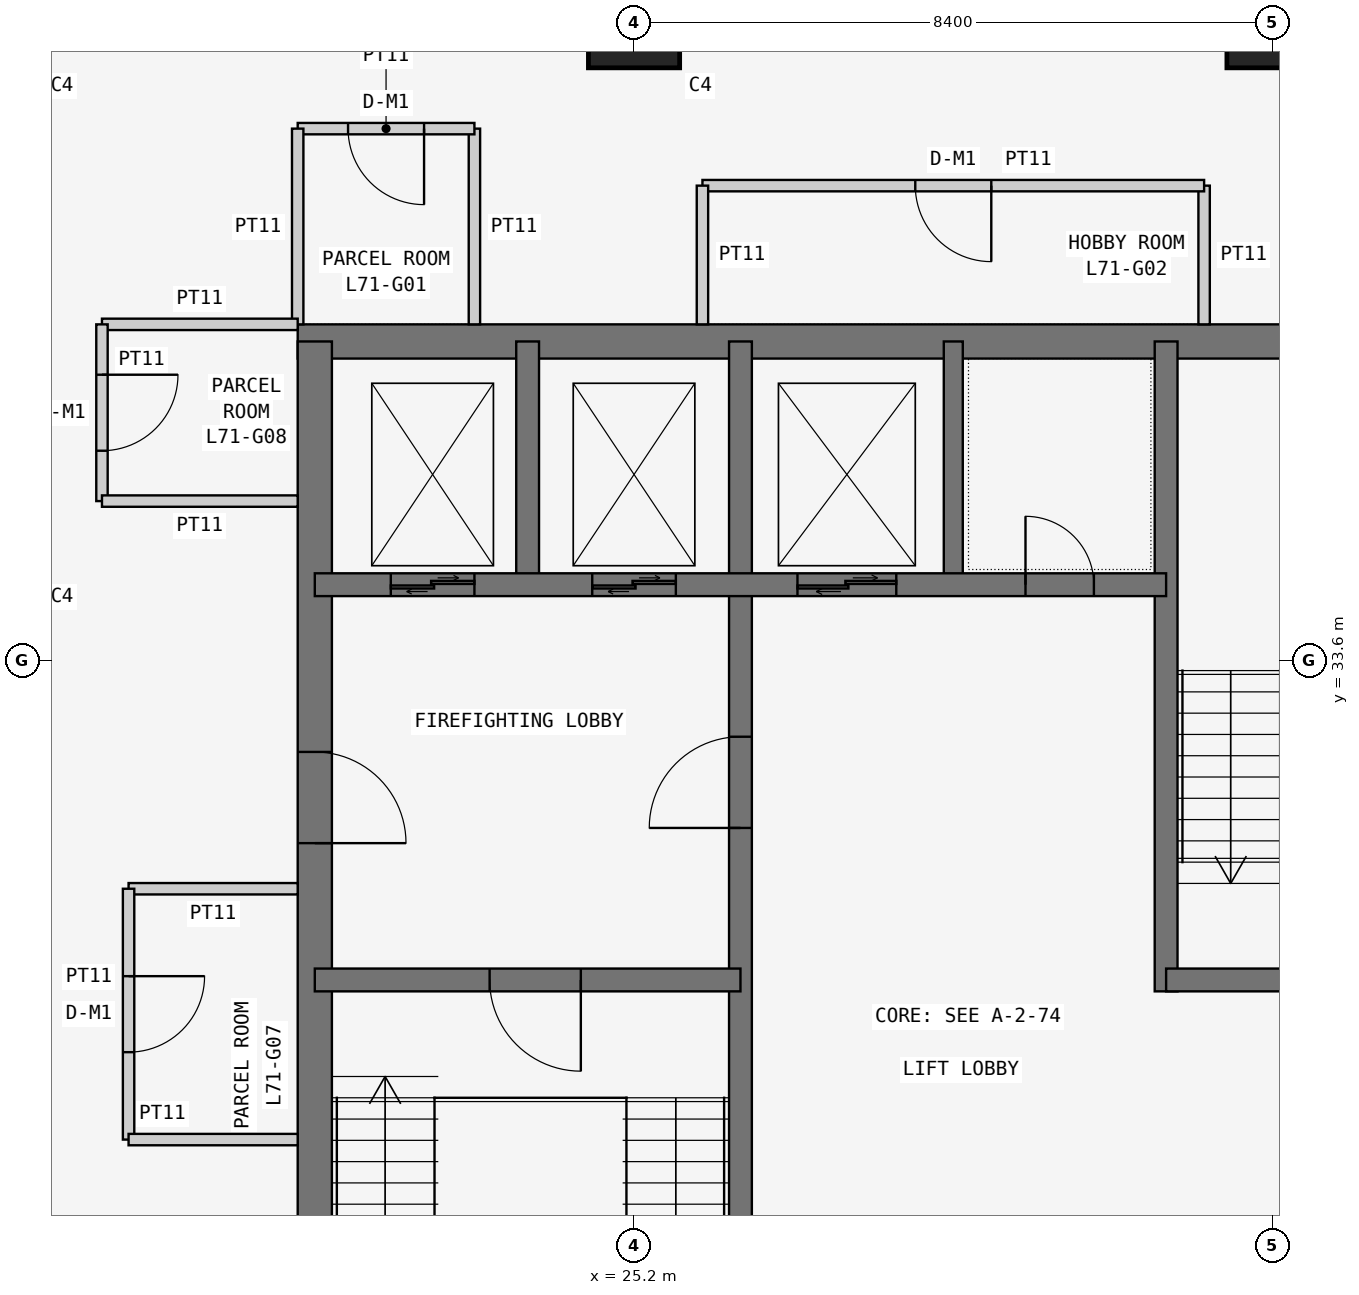
"""IFC4 building model, lengths in metres.
Left out: names, types, materials, properties, quantities, classifications, styles, units other than length and angle.
Written with IfcOpenShell. Run it as: python <this file> out.ifc"""

import sys

from ifc_helpers import new_model, si_unit, direction, frame, frame_2d, origin, origin_2d, place, context, subcontext, project, spatial, rectangle, extrude, element, fill, save


model = new_model("IFC4")
c1 = context("Model", 3, precision=1e-05, world=origin(), true_north=direction((0.0, 1.0)))
c2 = subcontext(c1, "Body", "Model", "MODEL_VIEW")
j1 = project(units=[si_unit("LENGTHUNIT", "METRE"), si_unit("PLANEANGLEUNIT", "RADIAN")], contexts=[c1])
p1 = place(None, origin())
s1 = spatial("IfcSite", under=j1, at=p1, CompositionType="ELEMENT")
p2 = place(p1, origin())
s2 = spatial("IfcBuilding", under=s1, at=p2, CompositionType="ELEMENT")
p3 = place(p2, frame((0.0, 0.0, 272.1)))
s3 = spatial("IfcBuildingStorey", under=s2, at=p3, CompositionType="ELEMENT", Elevation=272.1)
for number, where, z_axis, x_axis in (
    (1, (25.2, 42.0, 0.0), (0.0, 0.0, 1.0), (1.0, 0.0, 0.0)),
    (2, (33.6, 42.0, 0.0), (0.0, 0.0, 1.0), (1.0, 0.0, 0.0)),
):
    element("IfcColumn", number, at=place(p3, frame(where, z_axis=z_axis, x_axis=x_axis)), inside=s3, PredefinedType="COLUMN", context=c2, shape_type="SweptSolid", body=[
        extrude(rectangle(XDim=1.2, YDim=1.2, at=origin_2d()), origin(), (0.0, 0.0, 1.0), 3.6),
    ])
p4 = place(p3, frame((37.8, 37.8, 0.0), z_axis=(0.0, 0.0, 1.0), x_axis=(-1.0, 0.0, 0.0)))
e3 = element("IfcWall", 3, at=p4, inside=s3, PredefinedType="SHEAR", context=c2, shape_type="SweptSolid", body=[
    extrude(rectangle(XDim=17.025, YDim=0.45, at=frame_2d((8.513, 0.0))), origin(), (0.0, 0.0, 1.0), 3.6),
])
p5 = place(p3, frame((21.0, 37.8, 0.0), z_axis=(0.0, 0.0, 1.0), x_axis=(0.0, -1.0, 0.0)))
e4 = element("IfcWall", 4, at=p5, inside=s3, PredefinedType="SHEAR", context=c2, shape_type="SweptSolid", body=[
    extrude(rectangle(XDim=17.025, YDim=0.45, at=frame_2d((8.513, 0.0))), origin(), (0.0, 0.0, 1.0), 3.6),
])
p6 = place(p5, frame((5.4, 0.0, 0.0)))
e5 = element("IfcOpeningElement", 5, at=p6, cuts=e4, PredefinedType="OPENING", context=c2, shape_type="SweptSolid", body=[
    extrude(rectangle(XDim=1.2, YDim=2.1, at=frame_2d((0.6, 1.05))), frame((0.0, 0.235, 0.0), z_axis=(0.0, -1.0, 0.0), x_axis=(1.0, 0.0, 0.0)), (0.0, 0.0, 1.0), 0.47),
])
p7 = place(p3, frame((26.6, 21.0, 0.0), z_axis=(0.0, 0.0, 1.0), x_axis=(0.0, 1.0, 0.0)))
e6 = element("IfcWall", 6, at=p7, inside=s3, PredefinedType="SHEAR", context=c2, shape_type="SweptSolid", body=[
    extrude(rectangle(XDim=16.8, YDim=0.3, at=frame_2d((8.4, 0.0))), origin(), (0.0, 0.0, 1.0), 3.6),
])
p8 = place(p7, frame((10.4, 0.0, 0.0)))
e7 = element("IfcOpeningElement", 7, at=p8, cuts=e6, PredefinedType="OPENING", context=c2, shape_type="SweptSolid", body=[
    extrude(rectangle(XDim=1.2, YDim=2.1, at=frame_2d((0.6, 1.05))), frame((0.0, 0.16, 0.0), z_axis=(0.0, -1.0, 0.0), x_axis=(1.0, 0.0, 0.0)), (0.0, 0.0, 1.0), 0.32),
])
p9 = place(p3, frame((21.0, 29.4, 0.0), z_axis=(0.0, 0.0, 1.0), x_axis=(1.0, 0.0, 0.0)))
e8 = element("IfcWall", 8, at=p9, inside=s3, PredefinedType="SHEAR", context=c2, shape_type="SweptSolid", body=[
    extrude(rectangle(XDim=5.6, YDim=0.3, at=frame_2d((2.8, 0.0))), origin(), (0.0, 0.0, 1.0), 3.6),
])
p10 = place(p9, frame((2.3, 0.0, 0.0)))
e9 = element("IfcOpeningElement", 9, at=p10, cuts=e8, PredefinedType="OPENING", context=c2, shape_type="SweptSolid", body=[
    extrude(rectangle(XDim=1.2, YDim=2.1, at=frame_2d((0.6, 1.05))), frame((0.0, 0.16, 0.0), z_axis=(0.0, -1.0, 0.0), x_axis=(1.0, 0.0, 0.0)), (0.0, 0.0, 1.0), 0.32),
])
p11 = place(p3, frame((21.0, 34.6, 0.0), z_axis=(0.0, 0.0, 1.0), x_axis=(1.0, 0.0, 0.0)))
e10 = element("IfcWall", 10, at=p11, inside=s3, PredefinedType="SHEAR", context=c2, shape_type="SweptSolid", body=[
    extrude(rectangle(XDim=11.2, YDim=0.3, at=frame_2d((5.6, 0.0))), origin(), (0.0, 0.0, 1.0), 3.6),
])
p12 = place(p11, frame((9.35, 0.0, 0.0)))
e11 = element("IfcOpeningElement", 11, at=p12, cuts=e10, PredefinedType="OPENING", context=c2, shape_type="SweptSolid", body=[
    extrude(rectangle(XDim=0.9, YDim=2.1, at=frame_2d((0.45, 1.05))), frame((0.0, 0.16, 0.0), z_axis=(0.0, -1.0, 0.0), x_axis=(1.0, 0.0, 0.0)), (0.0, 0.0, 1.0), 0.32),
])
p13 = place(p11, frame((1.0, 0.0, 0.0)))
e12 = element("IfcOpeningElement", 12, at=p13, cuts=e10, PredefinedType="OPENING", context=c2, shape_type="SweptSolid", body=[
    extrude(rectangle(XDim=1.1, YDim=2.1, at=frame_2d((0.55, 1.05))), frame((0.0, 0.16, 0.0), z_axis=(0.0, -1.0, 0.0), x_axis=(1.0, 0.0, 0.0)), (0.0, 0.0, 1.0), 0.32),
])
p14 = place(p11, frame((3.65, 0.0, 0.0)))
e13 = element("IfcOpeningElement", 13, at=p14, cuts=e10, PredefinedType="OPENING", context=c2, shape_type="SweptSolid", body=[
    extrude(rectangle(XDim=1.1, YDim=2.1, at=frame_2d((0.55, 1.05))), frame((0.0, 0.16, 0.0), z_axis=(0.0, -1.0, 0.0), x_axis=(1.0, 0.0, 0.0)), (0.0, 0.0, 1.0), 0.32),
])
p15 = place(p11, frame((6.35, 0.0, 0.0)))
e14 = element("IfcOpeningElement", 14, at=p15, cuts=e10, PredefinedType="OPENING", context=c2, shape_type="SweptSolid", body=[
    extrude(rectangle(XDim=1.3, YDim=2.1, at=frame_2d((0.65, 1.05))), frame((0.0, 0.16, 0.0), z_axis=(0.0, -1.0, 0.0), x_axis=(1.0, 0.0, 0.0)), (0.0, 0.0, 1.0), 0.32),
])
p16 = place(p3, frame((23.8, 34.6, 0.0), z_axis=(0.0, 0.0, 1.0), x_axis=(0.0, 1.0, 0.0)))
e15 = element("IfcWall", 15, at=p16, inside=s3, PredefinedType="SHEAR", context=c2, shape_type="SweptSolid", body=[
    extrude(rectangle(XDim=3.2, YDim=0.3, at=frame_2d((1.6, 0.0))), origin(), (0.0, 0.0, 1.0), 3.6),
])
p17 = place(p3, frame((32.2, 29.25, 0.0), z_axis=(0.0, 0.0, 1.0), x_axis=(0.0, 1.0, 0.0)))
e16 = element("IfcWall", 16, at=p17, inside=s3, PredefinedType="SHEAR", context=c2, shape_type="SweptSolid", body=[
    extrude(rectangle(XDim=8.55, YDim=0.3, at=frame_2d((4.275, 0.0))), origin(), (0.0, 0.0, 1.0), 3.6),
])
p18 = place(p3, frame((32.2, 29.4, 0.0), z_axis=(0.0, 0.0, 1.0), x_axis=(1.0, 0.0, 0.0)))
e17 = element("IfcWall", 17, at=p18, inside=s3, PredefinedType="SHEAR", context=c2, shape_type="SweptSolid", body=[
    extrude(rectangle(XDim=5.6, YDim=0.3, at=frame_2d((2.8, 0.0))), origin(), (0.0, 0.0, 1.0), 3.6),
])
p19 = place(p18, frame((2.0, 0.0, 0.0)))
e18 = element("IfcOpeningElement", 18, at=p19, cuts=e17, PredefinedType="OPENING", context=c2, shape_type="SweptSolid", body=[
    extrude(rectangle(XDim=1.2, YDim=2.1, at=frame_2d((0.6, 1.05))), frame((0.0, 0.16, 0.0), z_axis=(0.0, -1.0, 0.0), x_axis=(1.0, 0.0, 0.0)), (0.0, 0.0, 1.0), 0.32),
])
p20 = place(p3, frame((29.4, 34.6, 0.0), z_axis=(0.0, 0.0, 1.0), x_axis=(0.0, 1.0, 0.0)))
e19 = element("IfcWall", 19, at=p20, inside=s3, PredefinedType="SHEAR", context=c2, shape_type="SweptSolid", body=[
    extrude(rectangle(XDim=3.2, YDim=0.25, at=frame_2d((1.6, 0.0))), origin(), (0.0, 0.0, 1.0), 3.6),
])
p21 = place(p3, frame((23.1, 38.025, 0.0), z_axis=(0.0, 0.0, 1.0), x_axis=(0.0, 1.0, 0.0)))
e20 = element("IfcWall", 20, at=p21, inside=s3, PredefinedType="PARTITIONING", context=c2, shape_type="SweptSolid", body=[
    extrude(rectangle(XDim=2.575, YDim=0.15, at=frame_2d((1.288, 0.0))), origin(), (0.0, 0.0, 1.0), 3.45),
])
p22 = place(p3, frame((23.1, 40.6, 0.0), z_axis=(0.0, 0.0, 1.0), x_axis=(-1.0, 0.0, 0.0)))
e21 = element("IfcWall", 21, at=p22, inside=s3, PredefinedType="PARTITIONING", context=c2, shape_type="SweptSolid", body=[
    extrude(rectangle(XDim=2.325, YDim=0.15, at=frame_2d((1.163, 0.0))), origin(), (0.0, 0.0, 1.0), 3.45),
])
p23 = place(p22, frame((0.663, 0.0, 0.0)))
e22 = element("IfcOpeningElement", 22, at=p23, cuts=e21, PredefinedType="OPENING", context=c2, shape_type="SweptSolid", body=[
    extrude(rectangle(XDim=1.0, YDim=2.1, at=frame_2d((0.5, 1.05))), frame((0.0, 0.085, 0.0), z_axis=(0.0, -1.0, 0.0), x_axis=(1.0, 0.0, 0.0)), (0.0, 0.0, 1.0), 0.17),
])
p24 = place(p3, frame((20.775, 40.6, 0.0), z_axis=(0.0, 0.0, 1.0), x_axis=(0.0, -1.0, 0.0)))
e23 = element("IfcWall", 23, at=p24, inside=s3, PredefinedType="PARTITIONING", context=c2, shape_type="SweptSolid", body=[
    extrude(rectangle(XDim=2.575, YDim=0.15, at=frame_2d((1.288, 0.0))), origin(), (0.0, 0.0, 1.0), 3.45),
])
p25 = place(p3, frame((32.7, 38.025, 0.0), z_axis=(0.0, 0.0, 1.0), x_axis=(0.0, 1.0, 0.0)))
e24 = element("IfcWall", 24, at=p25, inside=s3, PredefinedType="PARTITIONING", context=c2, shape_type="SweptSolid", body=[
    extrude(rectangle(XDim=1.825, YDim=0.15, at=frame_2d((0.913, 0.0))), origin(), (0.0, 0.0, 1.0), 3.45),
])
p26 = place(p3, frame((32.7, 39.85, 0.0), z_axis=(0.0, 0.0, 1.0), x_axis=(-1.0, 0.0, 0.0)))
e25 = element("IfcWall", 25, at=p26, inside=s3, PredefinedType="PARTITIONING", context=c2, shape_type="SweptSolid", body=[
    extrude(rectangle(XDim=6.6, YDim=0.15, at=frame_2d((3.3, 0.0))), origin(), (0.0, 0.0, 1.0), 3.45),
])
p27 = place(p26, frame((2.8, 0.0, 0.0)))
e26 = element("IfcOpeningElement", 26, at=p27, cuts=e25, PredefinedType="OPENING", context=c2, shape_type="SweptSolid", body=[
    extrude(rectangle(XDim=1.0, YDim=2.1, at=frame_2d((0.5, 1.05))), frame((0.0, 0.085, 0.0), z_axis=(0.0, -1.0, 0.0), x_axis=(1.0, 0.0, 0.0)), (0.0, 0.0, 1.0), 0.17),
])
p28 = place(p3, frame((26.1, 39.85, 0.0), z_axis=(0.0, 0.0, 1.0), x_axis=(0.0, -1.0, 0.0)))
e27 = element("IfcWall", 27, at=p28, inside=s3, PredefinedType="PARTITIONING", context=c2, shape_type="SweptSolid", body=[
    extrude(rectangle(XDim=1.825, YDim=0.15, at=frame_2d((0.913, 0.0))), origin(), (0.0, 0.0, 1.0), 3.45),
])
p29 = place(p3, frame((20.775, 30.6, 0.0), z_axis=(0.0, 0.0, 1.0), x_axis=(-1.0, 0.0, 0.0)))
e28 = element("IfcWall", 28, at=p29, inside=s3, PredefinedType="PARTITIONING", context=c2, shape_type="SweptSolid", body=[
    extrude(rectangle(XDim=2.225, YDim=0.15, at=frame_2d((1.112, 0.0))), origin(), (0.0, 0.0, 1.0), 3.45),
])
p30 = place(p3, frame((18.55, 30.6, 0.0), z_axis=(0.0, 0.0, 1.0), x_axis=(0.0, -1.0, 0.0)))
e29 = element("IfcWall", 29, at=p30, inside=s3, PredefinedType="PARTITIONING", context=c2, shape_type="SweptSolid", body=[
    extrude(rectangle(XDim=3.3, YDim=0.15, at=frame_2d((1.65, 0.0))), origin(), (0.0, 0.0, 1.0), 3.45),
])
p31 = place(p30, frame((1.15, 0.0, 0.0)))
e30 = element("IfcOpeningElement", 30, at=p31, cuts=e29, PredefinedType="OPENING", context=c2, shape_type="SweptSolid", body=[
    extrude(rectangle(XDim=1.0, YDim=2.1, at=frame_2d((0.5, 1.05))), frame((0.0, 0.085, 0.0), z_axis=(0.0, -1.0, 0.0), x_axis=(1.0, 0.0, 0.0)), (0.0, 0.0, 1.0), 0.17),
])
p32 = place(p3, frame((18.55, 27.3, 0.0), z_axis=(0.0, 0.0, 1.0), x_axis=(1.0, 0.0, 0.0)))
e31 = element("IfcWall", 31, at=p32, inside=s3, PredefinedType="PARTITIONING", context=c2, shape_type="SweptSolid", body=[
    extrude(rectangle(XDim=2.225, YDim=0.15, at=frame_2d((1.112, 0.0))), origin(), (0.0, 0.0, 1.0), 3.45),
])
p33 = place(p3, frame((20.775, 38.025, 0.0), z_axis=(0.0, 0.0, 1.0), x_axis=(-1.0, 0.0, 0.0)))
e32 = element("IfcWall", 32, at=p33, inside=s3, PredefinedType="PARTITIONING", context=c2, shape_type="SweptSolid", body=[
    extrude(rectangle(XDim=2.575, YDim=0.15, at=frame_2d((1.288, 0.0))), origin(), (0.0, 0.0, 1.0), 3.45),
])
p34 = place(p3, frame((18.2, 38.025, 0.0), z_axis=(0.0, 0.0, 1.0), x_axis=(0.0, -1.0, 0.0)))
e33 = element("IfcWall", 33, at=p34, inside=s3, PredefinedType="PARTITIONING", context=c2, shape_type="SweptSolid", body=[
    extrude(rectangle(XDim=2.325, YDim=0.15, at=frame_2d((1.163, 0.0))), origin(), (0.0, 0.0, 1.0), 3.45),
])
p35 = place(p34, frame((0.663, 0.0, 0.0)))
e34 = element("IfcOpeningElement", 34, at=p35, cuts=e33, PredefinedType="OPENING", context=c2, shape_type="SweptSolid", body=[
    extrude(rectangle(XDim=1.0, YDim=2.1, at=frame_2d((0.5, 1.05))), frame((0.0, 0.085, 0.0), z_axis=(0.0, -1.0, 0.0), x_axis=(1.0, 0.0, 0.0)), (0.0, 0.0, 1.0), 0.17),
])
p36 = place(p3, frame((18.2, 35.7, 0.0), z_axis=(0.0, 0.0, 1.0), x_axis=(1.0, 0.0, 0.0)))
e35 = element("IfcWall", 35, at=p36, inside=s3, PredefinedType="PARTITIONING", context=c2, shape_type="SweptSolid", body=[
    extrude(rectangle(XDim=2.575, YDim=0.15, at=frame_2d((1.288, 0.0))), origin(), (0.0, 0.0, 1.0), 3.45),
])
p37 = place(p23, origin())
e36 = element("IfcDoor", 36, at=p37, inside=s3, OperationType="SINGLE_SWING_LEFT", PredefinedType="DOOR", context=c2, shape_type="SweptSolid", body=[
    extrude(rectangle(XDim=1.0, YDim=2.1, at=frame_2d((0.5, 1.05))), frame((0.0, 0.025, 0.0), z_axis=(0.0, -1.0, 0.0), x_axis=(1.0, 0.0, 0.0)), (0.0, 0.0, 1.0), 0.05),
])
fill(e22, e36)
p38 = place(p27, origin())
e37 = element("IfcDoor", 37, at=p38, inside=s3, OperationType="SINGLE_SWING_LEFT", PredefinedType="DOOR", context=c2, shape_type="SweptSolid", body=[
    extrude(rectangle(XDim=1.0, YDim=2.1, at=frame_2d((0.5, 1.05))), frame((0.0, 0.025, 0.0), z_axis=(0.0, -1.0, 0.0), x_axis=(1.0, 0.0, 0.0)), (0.0, 0.0, 1.0), 0.05),
])
fill(e26, e37)
p39 = place(p31, origin())
e38 = element("IfcDoor", 38, at=p39, inside=s3, OperationType="SINGLE_SWING_LEFT", PredefinedType="DOOR", context=c2, shape_type="SweptSolid", body=[
    extrude(rectangle(XDim=1.0, YDim=2.1, at=frame_2d((0.5, 1.05))), frame((0.0, 0.025, 0.0), z_axis=(0.0, -1.0, 0.0), x_axis=(1.0, 0.0, 0.0)), (0.0, 0.0, 1.0), 0.05),
])
fill(e30, e38)
p40 = place(p35, origin())
e39 = element("IfcDoor", 39, at=p40, inside=s3, OperationType="SINGLE_SWING_LEFT", PredefinedType="DOOR", context=c2, shape_type="SweptSolid", body=[
    extrude(rectangle(XDim=1.0, YDim=2.1, at=frame_2d((0.5, 1.05))), frame((0.0, 0.025, 0.0), z_axis=(0.0, -1.0, 0.0), x_axis=(1.0, 0.0, 0.0)), (0.0, 0.0, 1.0), 0.05),
])
fill(e34, e39)
p41 = place(p6, origin())
e40 = element("IfcDoor", 40, at=p41, inside=s3, OperationType="SINGLE_SWING_RIGHT", PredefinedType="DOOR", context=c2, shape_type="SweptSolid", body=[
    extrude(rectangle(XDim=1.2, YDim=2.1, at=frame_2d((0.6, 1.05))), frame((0.0, 0.025, 0.0), z_axis=(0.0, -1.0, 0.0), x_axis=(1.0, 0.0, 0.0)), (0.0, 0.0, 1.0), 0.05),
])
fill(e5, e40)
p42 = place(p10, frame((1.2, 0.0, 0.0), z_axis=(0.0, 0.0, 1.0), x_axis=(-1.0, 0.0, 0.0)))
e41 = element("IfcDoor", 41, at=p42, inside=s3, OperationType="SINGLE_SWING_LEFT", PredefinedType="DOOR", context=c2, shape_type="SweptSolid", body=[
    extrude(rectangle(XDim=1.2, YDim=2.1, at=frame_2d((0.6, 1.05))), frame((0.0, 0.025, 0.0), z_axis=(0.0, -1.0, 0.0), x_axis=(1.0, 0.0, 0.0)), (0.0, 0.0, 1.0), 0.05),
])
fill(e9, e41)
p43 = place(p8, origin())
e42 = element("IfcDoor", 42, at=p43, inside=s3, OperationType="SINGLE_SWING_LEFT", PredefinedType="DOOR", context=c2, shape_type="SweptSolid", body=[
    extrude(rectangle(XDim=1.2, YDim=2.1, at=frame_2d((0.6, 1.05))), frame((0.0, 0.025, 0.0), z_axis=(0.0, -1.0, 0.0), x_axis=(1.0, 0.0, 0.0)), (0.0, 0.0, 1.0), 0.05),
])
fill(e7, e42)
p44 = place(p12, origin())
e43 = element("IfcDoor", 43, at=p44, inside=s3, OperationType="SINGLE_SWING_LEFT", PredefinedType="DOOR", context=c2, shape_type="SweptSolid", body=[
    extrude(rectangle(XDim=0.9, YDim=2.1, at=frame_2d((0.45, 1.05))), frame((0.0, 0.025, 0.0), z_axis=(0.0, -1.0, 0.0), x_axis=(1.0, 0.0, 0.0)), (0.0, 0.0, 1.0), 0.05),
])
fill(e11, e43)
p45 = place(p13, origin())
e44 = element("IfcDoor", 44, at=p45, inside=s3, OperationType="DOUBLE_DOOR_SLIDING", PredefinedType="DOOR", context=c2, shape_type="SweptSolid", body=[
    extrude(rectangle(XDim=1.1, YDim=2.1, at=frame_2d((0.55, 1.05))), frame((0.0, 0.025, 0.0), z_axis=(0.0, -1.0, 0.0), x_axis=(1.0, 0.0, 0.0)), (0.0, 0.0, 1.0), 0.05),
])
fill(e12, e44)
p46 = place(p14, origin())
e45 = element("IfcDoor", 45, at=p46, inside=s3, OperationType="DOUBLE_DOOR_SLIDING", PredefinedType="DOOR", context=c2, shape_type="SweptSolid", body=[
    extrude(rectangle(XDim=1.1, YDim=2.1, at=frame_2d((0.55, 1.05))), frame((0.0, 0.025, 0.0), z_axis=(0.0, -1.0, 0.0), x_axis=(1.0, 0.0, 0.0)), (0.0, 0.0, 1.0), 0.05),
])
fill(e13, e45)
p47 = place(p15, origin())
e46 = element("IfcDoor", 46, at=p47, inside=s3, OperationType="DOUBLE_DOOR_SLIDING", PredefinedType="DOOR", context=c2, shape_type="SweptSolid", body=[
    extrude(rectangle(XDim=1.3, YDim=2.1, at=frame_2d((0.65, 1.05))), frame((0.0, 0.025, 0.0), z_axis=(0.0, -1.0, 0.0), x_axis=(1.0, 0.0, 0.0)), (0.0, 0.0, 1.0), 0.05),
])
fill(e14, e46)
save(model, sys.argv[1])
